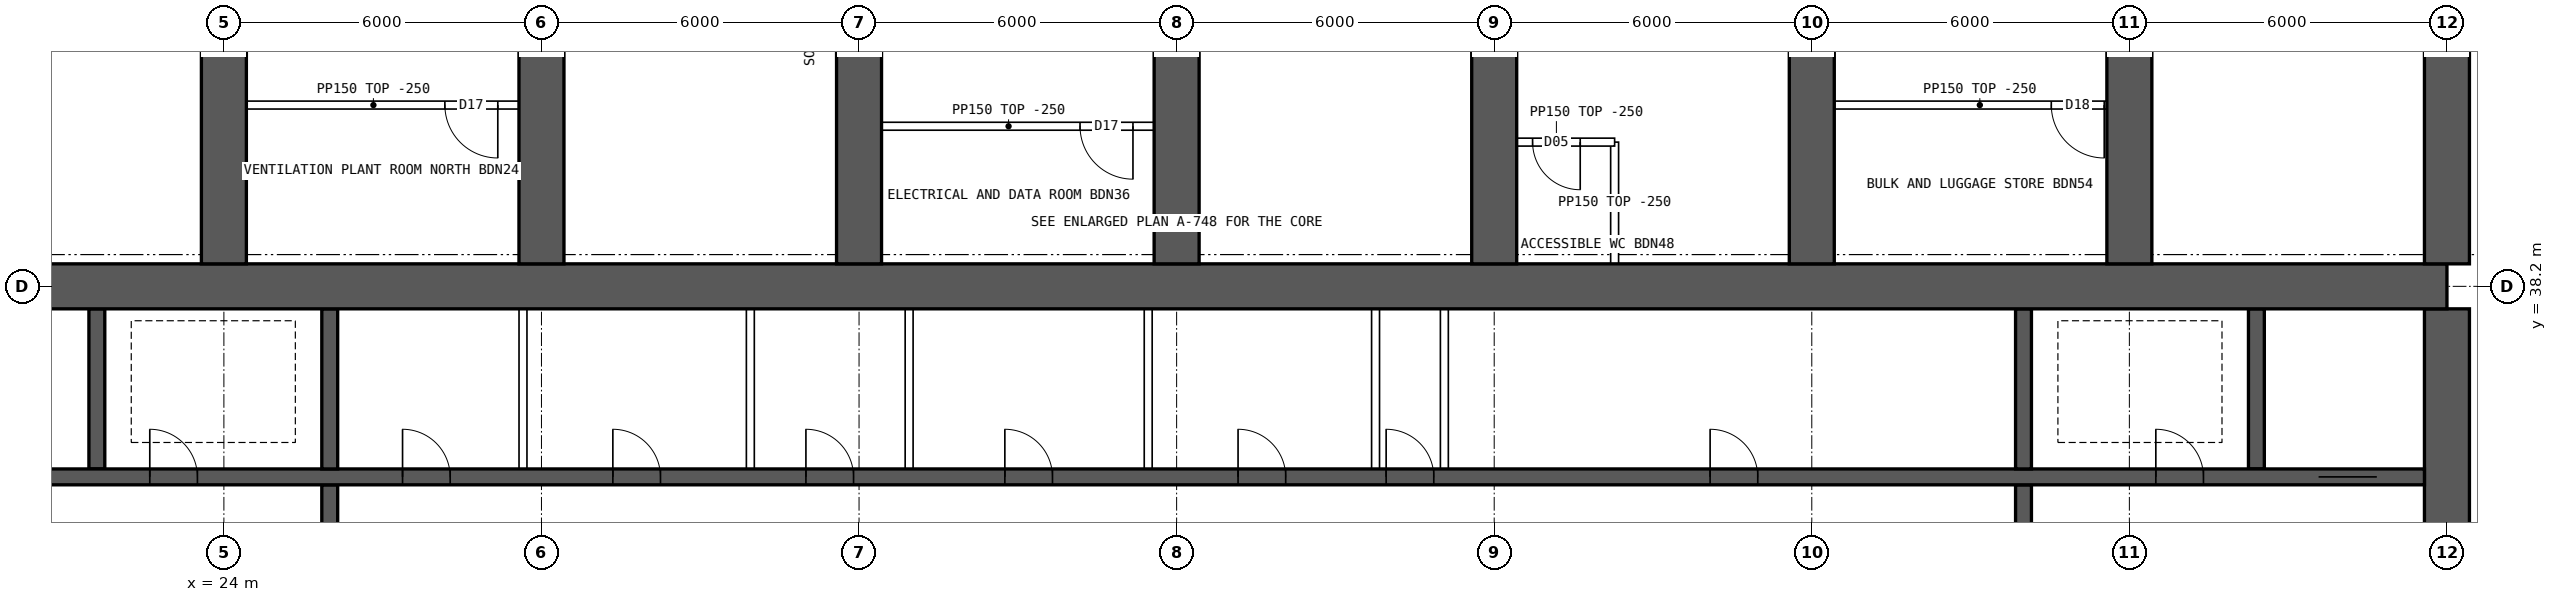
"""IFC4 building model, lengths in metres.
Left out: names, types, materials, properties, quantities, classifications, styles, units other than length and angle.
Written with IfcOpenShell. Run it as: python <this file> out.ifc"""

import sys

from ifc_helpers import new_model, si_unit, direction, frame, frame_2d, origin, place, context, subcontext, project, spatial, rectangle, extrude, element, fill, save


model = new_model("IFC4")
c1 = context("Model", 3, precision=1e-05, world=origin(), true_north=direction((0.0, 1.0)))
c2 = subcontext(c1, "Body", "Model", "MODEL_VIEW")
j1 = project(units=[si_unit("LENGTHUNIT", "METRE"), si_unit("PLANEANGLEUNIT", "RADIAN")], contexts=[c1])
p1 = place(None, origin())
s1 = spatial("IfcSite", under=j1, at=p1, CompositionType="ELEMENT")
p2 = place(p1, origin())
s2 = spatial("IfcBuilding", under=s1, at=p2, CompositionType="ELEMENT")
p3 = place(p2, frame((0.0, 0.0, 182.35)))
s3 = spatial("IfcBuildingStorey", under=s2, at=p3, CompositionType="ELEMENT", Elevation=182.35)
p4 = place(p3, frame((18.0, 38.2, 0.0), z_axis=(0.0, 0.0, 1.0), x_axis=(1.0, 0.0, 0.0)))
e1 = element("IfcWall", 1, at=p4, inside=s3, PredefinedType="SHEAR", context=c2, shape_type="SweptSolid", body=[
    extrude(rectangle(XDim=48.0, YDim=0.85, at=frame_2d((24.0, 0.0))), origin(), (0.0, 0.0, 1.0), 3.75),
])
p5 = place(p3, frame((66.0, 26.225, 0.0), z_axis=(0.0, 0.0, 1.0), x_axis=(0.0, 1.0, 0.0)))
e2 = element("IfcWall", 2, at=p5, inside=s3, PredefinedType="SHEAR", context=c2, shape_type="SweptSolid", body=[
    extrude(rectangle(XDim=11.55, YDim=0.85, at=frame_2d((5.775, 0.0))), origin(), (0.0, 0.0, 1.0), 3.75),
])
p6 = place(p5, frame((5.075, 0.0, 0.0)))
e3 = element("IfcOpeningElement", 3, at=p6, cuts=e2, PredefinedType="OPENING", context=c2, shape_type="SweptSolid", body=[
    extrude(rectangle(XDim=1.2, YDim=2.1, at=frame_2d((0.6, 1.05))), frame((0.0, 0.435, 0.0), z_axis=(0.0, -1.0, 0.0), x_axis=(1.0, 0.0, 0.0)), (0.0, 0.0, 1.0), 0.87),
])
p7 = place(p3, frame((18.425, 34.6, 0.0), z_axis=(0.0, 0.0, 1.0), x_axis=(1.0, 0.0, 0.0)))
e4 = element("IfcWall", 4, at=p7, inside=s3, PredefinedType="SHEAR", context=c2, shape_type="SweptSolid", body=[
    extrude(rectangle(XDim=47.15, YDim=0.3, at=frame_2d((23.575, 0.0))), origin(), (0.0, 0.0, 1.0), 3.75),
])
p8 = place(p7, frame((0.9, 0.0, 0.0)))
e5 = element("IfcOpeningElement", 5, at=p8, cuts=e4, PredefinedType="OPENING", context=c2, shape_type="SweptSolid", body=[
    extrude(rectangle(XDim=1.1, YDim=2.1, at=frame_2d((0.55, 1.05))), frame((0.0, 0.16, 0.0), z_axis=(0.0, -1.0, 0.0), x_axis=(1.0, 0.0, 0.0)), (0.0, 0.0, 1.0), 0.32),
])
p9 = place(p7, frame((45.15, 0.0, 0.0)))
e6 = element("IfcOpeningElement", 6, at=p9, cuts=e4, PredefinedType="OPENING", context=c2, shape_type="SweptSolid", body=[
    extrude(rectangle(XDim=1.1, YDim=2.1, at=frame_2d((0.55, 1.05))), frame((0.0, 0.16, 0.0), z_axis=(0.0, -1.0, 0.0), x_axis=(1.0, 0.0, 0.0)), (0.0, 0.0, 1.0), 0.32),
])
p10 = place(p7, frame((4.175, 0.0, 0.0)))
e7 = element("IfcOpeningElement", 7, at=p10, cuts=e4, PredefinedType="OPENING", context=c2, shape_type="SweptSolid", body=[
    extrude(rectangle(XDim=0.9, YDim=2.1, at=frame_2d((0.45, 1.05))), frame((0.0, 0.16, 0.0), z_axis=(0.0, -1.0, 0.0), x_axis=(1.0, 0.0, 0.0)), (0.0, 0.0, 1.0), 0.32),
])
p11 = place(p7, frame((42.075, 0.0, 0.0)))
e8 = element("IfcOpeningElement", 8, at=p11, cuts=e4, PredefinedType="OPENING", context=c2, shape_type="SweptSolid", body=[
    extrude(rectangle(XDim=0.9, YDim=2.1, at=frame_2d((0.45, 1.05))), frame((0.0, 0.16, 0.0), z_axis=(0.0, -1.0, 0.0), x_axis=(1.0, 0.0, 0.0)), (0.0, 0.0, 1.0), 0.32),
])
p12 = place(p7, frame((8.95, 0.0, 0.0)))
e9 = element("IfcOpeningElement", 9, at=p12, cuts=e4, PredefinedType="OPENING", context=c2, shape_type="SweptSolid", body=[
    extrude(rectangle(XDim=0.9, YDim=2.1, at=frame_2d((0.45, 1.05))), frame((0.0, 0.16, 0.0), z_axis=(0.0, -1.0, 0.0), x_axis=(1.0, 0.0, 0.0)), (0.0, 0.0, 1.0), 0.32),
])
p13 = place(p7, frame((12.924, 0.0, 0.0)))
e10 = element("IfcOpeningElement", 10, at=p13, cuts=e4, PredefinedType="OPENING", context=c2, shape_type="SweptSolid", body=[
    extrude(rectangle(XDim=0.9, YDim=2.1, at=frame_2d((0.45, 1.05))), frame((0.0, 0.16, 0.0), z_axis=(0.0, -1.0, 0.0), x_axis=(1.0, 0.0, 0.0)), (0.0, 0.0, 1.0), 0.32),
])
p14 = place(p7, frame((16.571, 0.0, 0.0)))
e11 = element("IfcOpeningElement", 11, at=p14, cuts=e4, PredefinedType="OPENING", context=c2, shape_type="SweptSolid", body=[
    extrude(rectangle(XDim=0.9, YDim=2.1, at=frame_2d((0.45, 1.05))), frame((0.0, 0.16, 0.0), z_axis=(0.0, -1.0, 0.0), x_axis=(1.0, 0.0, 0.0)), (0.0, 0.0, 1.0), 0.32),
])
p15 = place(p7, frame((20.33, 0.0, 0.0)))
e12 = element("IfcOpeningElement", 12, at=p15, cuts=e4, PredefinedType="OPENING", context=c2, shape_type="SweptSolid", body=[
    extrude(rectangle(XDim=0.9, YDim=2.1, at=frame_2d((0.45, 1.05))), frame((0.0, 0.16, 0.0), z_axis=(0.0, -1.0, 0.0), x_axis=(1.0, 0.0, 0.0)), (0.0, 0.0, 1.0), 0.32),
])
p16 = place(p7, frame((24.736, 0.0, 0.0)))
e13 = element("IfcOpeningElement", 13, at=p16, cuts=e4, PredefinedType="OPENING", context=c2, shape_type="SweptSolid", body=[
    extrude(rectangle(XDim=0.9, YDim=2.1, at=frame_2d((0.45, 1.05))), frame((0.0, 0.16, 0.0), z_axis=(0.0, -1.0, 0.0), x_axis=(1.0, 0.0, 0.0)), (0.0, 0.0, 1.0), 0.32),
])
p17 = place(p7, frame((27.533, 0.0, 0.0)))
e14 = element("IfcOpeningElement", 14, at=p17, cuts=e4, PredefinedType="OPENING", context=c2, shape_type="SweptSolid", body=[
    extrude(rectangle(XDim=0.9, YDim=2.1, at=frame_2d((0.45, 1.05))), frame((0.0, 0.16, 0.0), z_axis=(0.0, -1.0, 0.0), x_axis=(1.0, 0.0, 0.0)), (0.0, 0.0, 1.0), 0.32),
])
p18 = place(p7, frame((33.654, 0.0, 0.0)))
e15 = element("IfcOpeningElement", 15, at=p18, cuts=e4, PredefinedType="OPENING", context=c2, shape_type="SweptSolid", body=[
    extrude(rectangle(XDim=0.9, YDim=2.1, at=frame_2d((0.45, 1.05))), frame((0.0, 0.16, 0.0), z_axis=(0.0, -1.0, 0.0), x_axis=(1.0, 0.0, 0.0)), (0.0, 0.0, 1.0), 0.32),
])
p19 = place(p3, frame((26.0, 30.55, 0.0), z_axis=(0.0, 0.0, 1.0), x_axis=(0.0, 1.0, 0.0)))
e16 = element("IfcWall", 16, at=p19, inside=s3, PredefinedType="SHEAR", context=c2, shape_type="SweptSolid", body=[
    extrude(rectangle(XDim=3.9, YDim=0.3, at=frame_2d((1.95, 0.0))), origin(), (0.0, 0.0, 1.0), 3.75),
])
p20 = place(p19, frame((1.4, 0.0, 0.0)))
e17 = element("IfcOpeningElement", 17, at=p20, cuts=e16, PredefinedType="OPENING", context=c2, shape_type="SweptSolid", body=[
    extrude(rectangle(XDim=1.2, YDim=2.1, at=frame_2d((0.6, 1.05))), frame((0.0, 0.16, 0.0), z_axis=(0.0, -1.0, 0.0), x_axis=(1.0, 0.0, 0.0)), (0.0, 0.0, 1.0), 0.32),
])
p21 = place(p3, frame((58.0, 30.55, 0.0), z_axis=(0.0, 0.0, 1.0), x_axis=(0.0, 1.0, 0.0)))
e18 = element("IfcWall", 18, at=p21, inside=s3, PredefinedType="SHEAR", context=c2, shape_type="SweptSolid", body=[
    extrude(rectangle(XDim=3.9, YDim=0.3, at=frame_2d((1.95, 0.0))), origin(), (0.0, 0.0, 1.0), 3.75),
])
p22 = place(p21, frame((1.4, 0.0, 0.0)))
e19 = element("IfcOpeningElement", 19, at=p22, cuts=e18, PredefinedType="OPENING", context=c2, shape_type="SweptSolid", body=[
    extrude(rectangle(XDim=1.2, YDim=2.1, at=frame_2d((0.6, 1.05))), frame((0.0, 0.16, 0.0), z_axis=(0.0, -1.0, 0.0), x_axis=(1.0, 0.0, 0.0)), (0.0, 0.0, 1.0), 0.32),
])
for number, where, z_axis, x_axis in (
    (20, (21.6, 34.75, 0.0), (0.0, 0.0, 1.0), (0.0, 1.0, 0.0)),
    (21, (62.4, 34.75, 0.0), (0.0, 0.0, 1.0), (0.0, 1.0, 0.0)),
    (22, (26.0, 34.75, 0.0), (0.0, 0.0, 1.0), (0.0, 1.0, 0.0)),
    (23, (58.0, 34.75, 0.0), (0.0, 0.0, 1.0), (0.0, 1.0, 0.0)),
):
    element("IfcWall", number, at=place(p3, frame(where, z_axis=z_axis, x_axis=x_axis)), inside=s3, PredefinedType="SHEAR", context=c2, shape_type="SweptSolid", body=[
        extrude(rectangle(XDim=3.025, YDim=0.3, at=frame_2d((1.512, 0.0))), origin(), (0.0, 0.0, 1.0), 3.75),
    ])
for number, where, z_axis, x_axis in (
    (24, (24.0, 38.625, 0.0), (0.0, 0.0, 1.0), (0.0, 1.0, 0.0)),
    (25, (30.0, 38.625, 0.0), (0.0, 0.0, 1.0), (0.0, 1.0, 0.0)),
    (26, (36.0, 38.625, 0.0), (0.0, 0.0, 1.0), (0.0, 1.0, 0.0)),
    (27, (42.0, 38.625, 0.0), (0.0, 0.0, 1.0), (0.0, 1.0, 0.0)),
    (28, (48.0, 38.625, 0.0), (0.0, 0.0, 1.0), (0.0, 1.0, 0.0)),
    (29, (54.0, 38.625, 0.0), (0.0, 0.0, 1.0), (0.0, 1.0, 0.0)),
    (30, (60.0, 38.625, 0.0), (0.0, 0.0, 1.0), (0.0, 1.0, 0.0)),
    (31, (66.0, 38.625, 0.0), (0.0, 0.0, 1.0), (0.0, 1.0, 0.0)),
):
    element("IfcWall", number, at=place(p3, frame(where, z_axis=z_axis, x_axis=x_axis)), inside=s3, PredefinedType="SHEAR", context=c2, shape_type="SweptSolid", body=[
        extrude(rectangle(XDim=8.175, YDim=0.85, at=frame_2d((4.087, 0.0))), origin(), (0.0, 0.0, 1.0), 3.75),
    ])
for number, where, z_axis, x_axis in (
    (32, (29.651, 34.75, 0.0), (0.0, 0.0, 1.0), (0.0, 1.0, 0.0)),
    (33, (33.946, 34.75, 0.0), (0.0, 0.0, 1.0), (0.0, 1.0, 0.0)),
    (34, (36.946, 34.75, 0.0), (0.0, 0.0, 1.0), (0.0, 1.0, 0.0)),
    (35, (41.463, 34.75, 0.0), (0.0, 0.0, 1.0), (0.0, 1.0, 0.0)),
    (36, (45.758, 34.75, 0.0), (0.0, 0.0, 1.0), (0.0, 1.0, 0.0)),
    (37, (47.058, 34.75, 0.0), (0.0, 0.0, 1.0), (0.0, 1.0, 0.0)),
):
    element("IfcWall", number, at=place(p3, frame(where, z_axis=z_axis, x_axis=x_axis)), inside=s3, PredefinedType="SOLIDWALL", context=c2, shape_type="SweptSolid", body=[
        extrude(rectangle(XDim=3.025, YDim=0.15, at=frame_2d((1.512, 0.0))), origin(), (0.0, 0.0, 1.0), 3.5),
    ])
p23 = place(p3, frame((29.575, 41.625, 0.0), z_axis=(0.0, 0.0, 1.0), x_axis=(-1.0, 0.0, 0.0)))
e38 = element("IfcWall", 38, at=p23, inside=s3, PredefinedType="PARTITIONING", context=c2, shape_type="SweptSolid", body=[
    extrude(rectangle(XDim=5.5, YDim=0.15, at=frame_2d((2.75, 0.0))), origin(), (0.0, 0.0, 1.0), 3.5),
])
p24 = place(p23, frame((0.4, 0.0, 0.0)))
e39 = element("IfcOpeningElement", 39, at=p24, cuts=e38, PredefinedType="OPENING", context=c2, shape_type="SweptSolid", body=[
    extrude(rectangle(XDim=1.0, YDim=2.1, at=frame_2d((0.5, 1.05))), frame((0.0, 0.085, 0.0), z_axis=(0.0, -1.0, 0.0), x_axis=(1.0, 0.0, 0.0)), (0.0, 0.0, 1.0), 0.17),
])
p25 = place(p3, frame((41.575, 41.225, 0.0), z_axis=(0.0, 0.0, 1.0), x_axis=(-1.0, 0.0, 0.0)))
e40 = element("IfcWall", 40, at=p25, inside=s3, PredefinedType="PARTITIONING", context=c2, shape_type="SweptSolid", body=[
    extrude(rectangle(XDim=5.5, YDim=0.15, at=frame_2d((2.75, 0.0))), origin(), (0.0, 0.0, 1.0), 3.5),
])
p26 = place(p25, frame((0.4, 0.0, 0.0)))
e41 = element("IfcOpeningElement", 41, at=p26, cuts=e40, PredefinedType="OPENING", context=c2, shape_type="SweptSolid", body=[
    extrude(rectangle(XDim=1.0, YDim=2.1, at=frame_2d((0.5, 1.05))), frame((0.0, 0.085, 0.0), z_axis=(0.0, -1.0, 0.0), x_axis=(1.0, 0.0, 0.0)), (0.0, 0.0, 1.0), 0.17),
])
p27 = place(p3, frame((50.275, 40.925, 0.0), z_axis=(0.0, 0.0, 1.0), x_axis=(0.0, -1.0, 0.0)))
e42 = element("IfcWall", 42, at=p27, inside=s3, PredefinedType="PARTITIONING", context=c2, shape_type="SweptSolid", body=[
    extrude(rectangle(XDim=2.3, YDim=0.15, at=frame_2d((1.15, 0.0))), origin(), (0.0, 0.0, 1.0), 3.5),
])
p28 = place(p3, frame((50.275, 40.925, 0.0), z_axis=(0.0, 0.0, 1.0), x_axis=(-1.0, 0.0, 0.0)))
e43 = element("IfcWall", 43, at=p28, inside=s3, PredefinedType="PARTITIONING", context=c2, shape_type="SweptSolid", body=[
    extrude(rectangle(XDim=2.2, YDim=0.15, at=frame_2d((1.1, 0.0))), origin(), (0.0, 0.0, 1.0), 3.5),
])
p29 = place(p28, frame((0.65, 0.0, 0.0)))
e44 = element("IfcOpeningElement", 44, at=p29, cuts=e43, PredefinedType="OPENING", context=c2, shape_type="SweptSolid", body=[
    extrude(rectangle(XDim=0.9, YDim=2.1, at=frame_2d((0.45, 1.05))), frame((0.0, 0.085, 0.0), z_axis=(0.0, -1.0, 0.0), x_axis=(1.0, 0.0, 0.0)), (0.0, 0.0, 1.0), 0.17),
])
p30 = place(p3, frame((59.925, 41.625, 0.0), z_axis=(0.0, 0.0, 1.0), x_axis=(-1.0, 0.0, 0.0)))
e45 = element("IfcWall", 45, at=p30, inside=s3, PredefinedType="PARTITIONING", context=c2, shape_type="SweptSolid", body=[
    extrude(rectangle(XDim=5.5, YDim=0.15, at=frame_2d((2.75, 0.0))), origin(), (0.0, 0.0, 1.0), 3.5),
])
p31 = place(p30, frame((0.4, 0.0, 0.0)))
e46 = element("IfcOpeningElement", 46, at=p31, cuts=e45, PredefinedType="OPENING", context=c2, shape_type="SweptSolid", body=[
    extrude(rectangle(XDim=1.0, YDim=2.1, at=frame_2d((0.5, 1.05))), frame((0.0, 0.085, 0.0), z_axis=(0.0, -1.0, 0.0), x_axis=(1.0, 0.0, 0.0)), (0.0, 0.0, 1.0), 0.17),
])
p32 = place(p9, origin())
e47 = element("IfcDoor", 47, at=p32, inside=s3, OperationType="DOUBLE_DOOR_SLIDING", PredefinedType="DOOR", context=c2, shape_type="SweptSolid", body=[
    extrude(rectangle(XDim=1.1, YDim=2.1, at=frame_2d((0.55, 1.05))), frame((0.0, 0.025, 0.0), z_axis=(0.0, -1.0, 0.0), x_axis=(1.0, 0.0, 0.0)), (0.0, 0.0, 1.0), 0.05),
])
fill(e6, e47)
p33 = place(p10, origin())
e48 = element("IfcDoor", 48, at=p33, inside=s3, OperationType="SINGLE_SWING_LEFT", PredefinedType="DOOR", context=c2, shape_type="SweptSolid", body=[
    extrude(rectangle(XDim=0.9, YDim=2.1, at=frame_2d((0.45, 1.05))), frame((0.0, 0.025, 0.0), z_axis=(0.0, -1.0, 0.0), x_axis=(1.0, 0.0, 0.0)), (0.0, 0.0, 1.0), 0.05),
])
fill(e7, e48)
p34 = place(p11, origin())
e49 = element("IfcDoor", 49, at=p34, inside=s3, OperationType="SINGLE_SWING_LEFT", PredefinedType="DOOR", context=c2, shape_type="SweptSolid", body=[
    extrude(rectangle(XDim=0.9, YDim=2.1, at=frame_2d((0.45, 1.05))), frame((0.0, 0.025, 0.0), z_axis=(0.0, -1.0, 0.0), x_axis=(1.0, 0.0, 0.0)), (0.0, 0.0, 1.0), 0.05),
])
fill(e8, e49)
p35 = place(p12, origin())
e50 = element("IfcDoor", 50, at=p35, inside=s3, OperationType="SINGLE_SWING_LEFT", PredefinedType="DOOR", context=c2, shape_type="SweptSolid", body=[
    extrude(rectangle(XDim=0.9, YDim=2.1, at=frame_2d((0.45, 1.05))), frame((0.0, 0.025, 0.0), z_axis=(0.0, -1.0, 0.0), x_axis=(1.0, 0.0, 0.0)), (0.0, 0.0, 1.0), 0.05),
])
fill(e9, e50)
p36 = place(p13, origin())
e51 = element("IfcDoor", 51, at=p36, inside=s3, OperationType="SINGLE_SWING_LEFT", PredefinedType="DOOR", context=c2, shape_type="SweptSolid", body=[
    extrude(rectangle(XDim=0.9, YDim=2.1, at=frame_2d((0.45, 1.05))), frame((0.0, 0.025, 0.0), z_axis=(0.0, -1.0, 0.0), x_axis=(1.0, 0.0, 0.0)), (0.0, 0.0, 1.0), 0.05),
])
fill(e10, e51)
p37 = place(p14, origin())
e52 = element("IfcDoor", 52, at=p37, inside=s3, OperationType="SINGLE_SWING_LEFT", PredefinedType="DOOR", context=c2, shape_type="SweptSolid", body=[
    extrude(rectangle(XDim=0.9, YDim=2.1, at=frame_2d((0.45, 1.05))), frame((0.0, 0.025, 0.0), z_axis=(0.0, -1.0, 0.0), x_axis=(1.0, 0.0, 0.0)), (0.0, 0.0, 1.0), 0.05),
])
fill(e11, e52)
p38 = place(p15, origin())
e53 = element("IfcDoor", 53, at=p38, inside=s3, OperationType="SINGLE_SWING_LEFT", PredefinedType="DOOR", context=c2, shape_type="SweptSolid", body=[
    extrude(rectangle(XDim=0.9, YDim=2.1, at=frame_2d((0.45, 1.05))), frame((0.0, 0.025, 0.0), z_axis=(0.0, -1.0, 0.0), x_axis=(1.0, 0.0, 0.0)), (0.0, 0.0, 1.0), 0.05),
])
fill(e12, e53)
p39 = place(p16, origin())
e54 = element("IfcDoor", 54, at=p39, inside=s3, OperationType="SINGLE_SWING_LEFT", PredefinedType="DOOR", context=c2, shape_type="SweptSolid", body=[
    extrude(rectangle(XDim=0.9, YDim=2.1, at=frame_2d((0.45, 1.05))), frame((0.0, 0.025, 0.0), z_axis=(0.0, -1.0, 0.0), x_axis=(1.0, 0.0, 0.0)), (0.0, 0.0, 1.0), 0.05),
])
fill(e13, e54)
p40 = place(p17, origin())
e55 = element("IfcDoor", 55, at=p40, inside=s3, OperationType="SINGLE_SWING_LEFT", PredefinedType="DOOR", context=c2, shape_type="SweptSolid", body=[
    extrude(rectangle(XDim=0.9, YDim=2.1, at=frame_2d((0.45, 1.05))), frame((0.0, 0.025, 0.0), z_axis=(0.0, -1.0, 0.0), x_axis=(1.0, 0.0, 0.0)), (0.0, 0.0, 1.0), 0.05),
])
fill(e14, e55)
p41 = place(p18, origin())
e56 = element("IfcDoor", 56, at=p41, inside=s3, OperationType="SINGLE_SWING_LEFT", PredefinedType="DOOR", context=c2, shape_type="SweptSolid", body=[
    extrude(rectangle(XDim=0.9, YDim=2.1, at=frame_2d((0.45, 1.05))), frame((0.0, 0.025, 0.0), z_axis=(0.0, -1.0, 0.0), x_axis=(1.0, 0.0, 0.0)), (0.0, 0.0, 1.0), 0.05),
])
fill(e15, e56)
p42 = place(p24, origin())
e57 = element("IfcDoor", 57, at=p42, inside=s3, OperationType="SINGLE_SWING_LEFT", PredefinedType="DOOR", context=c2, shape_type="SweptSolid", body=[
    extrude(rectangle(XDim=1.0, YDim=2.1, at=frame_2d((0.5, 1.05))), frame((0.0, 0.025, 0.0), z_axis=(0.0, -1.0, 0.0), x_axis=(1.0, 0.0, 0.0)), (0.0, 0.0, 1.0), 0.05),
])
fill(e39, e57)
p43 = place(p26, origin())
e58 = element("IfcDoor", 58, at=p43, inside=s3, OperationType="SINGLE_SWING_LEFT", PredefinedType="DOOR", context=c2, shape_type="SweptSolid", body=[
    extrude(rectangle(XDim=1.0, YDim=2.1, at=frame_2d((0.5, 1.05))), frame((0.0, 0.025, 0.0), z_axis=(0.0, -1.0, 0.0), x_axis=(1.0, 0.0, 0.0)), (0.0, 0.0, 1.0), 0.05),
])
fill(e41, e58)
p44 = place(p29, origin())
e59 = element("IfcDoor", 59, at=p44, inside=s3, OperationType="SINGLE_SWING_LEFT", PredefinedType="DOOR", context=c2, shape_type="SweptSolid", body=[
    extrude(rectangle(XDim=0.9, YDim=2.1, at=frame_2d((0.45, 1.05))), frame((0.0, 0.025, 0.0), z_axis=(0.0, -1.0, 0.0), x_axis=(1.0, 0.0, 0.0)), (0.0, 0.0, 1.0), 0.05),
])
fill(e44, e59)
p45 = place(p31, origin())
e60 = element("IfcDoor", 60, at=p45, inside=s3, OperationType="SINGLE_SWING_LEFT", PredefinedType="DOOR", context=c2, shape_type="SweptSolid", body=[
    extrude(rectangle(XDim=1.0, YDim=2.1, at=frame_2d((0.5, 1.05))), frame((0.0, 0.025, 0.0), z_axis=(0.0, -1.0, 0.0), x_axis=(1.0, 0.0, 0.0)), (0.0, 0.0, 1.0), 0.05),
])
fill(e46, e60)
save(model, sys.argv[1])
